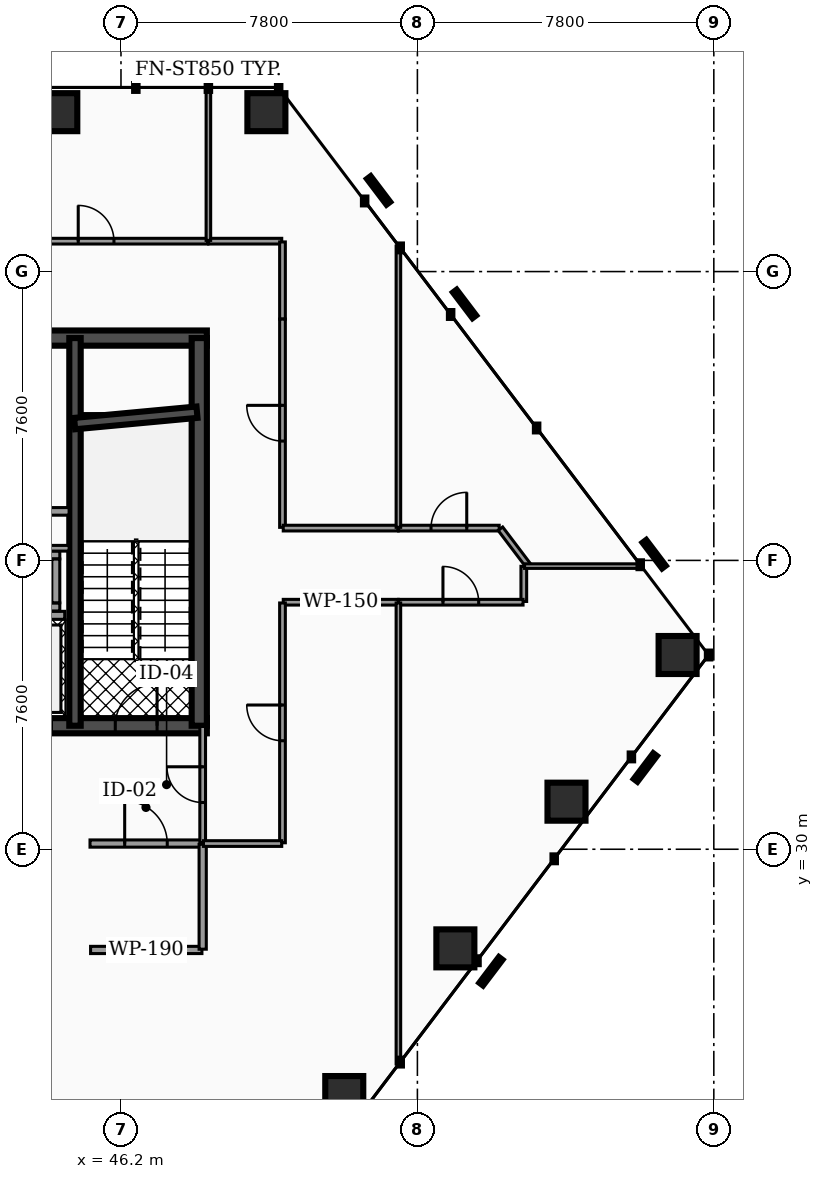
"""IFC4 building model, lengths in metres.
Left out: names, types, materials, properties, quantities, classifications, styles, units other than length and angle.
Written with IfcOpenShell. Run it as: python <this file> out.ifc"""

import sys

from ifc_helpers import new_model, si_unit, direction, frame, frame_2d, origin, origin_2d, place, context, subcontext, project, spatial, rectangle, hollow_rectangle, extrude, element, fill, save


model = new_model("IFC4")
c1 = context("Model", 3, precision=1e-05, world=origin(), true_north=direction((0.0, 1.0)))
c2 = subcontext(c1, "Body", "Model", "MODEL_VIEW")
j1 = project(units=[si_unit("LENGTHUNIT", "METRE"), si_unit("PLANEANGLEUNIT", "RADIAN")], contexts=[c1])
p1 = place(None, origin())
s1 = spatial("IfcSite", under=j1, at=p1, CompositionType="ELEMENT")
p2 = place(p1, origin())
s2 = spatial("IfcBuilding", under=s1, at=p2, CompositionType="ELEMENT")
p3 = place(p2, frame((0.0, 0.0, 43.86)))
s3 = spatial("IfcBuildingStorey", under=s2, at=p3, CompositionType="ELEMENT", Elevation=43.86)
p4 = place(p3, frame((28.4, 43.45, 0.0), z_axis=(0.0, 0.0, 1.0), x_axis=(1.0, 0.0, 0.0)))
e1 = element("IfcWall", 1, at=p4, inside=s3, PredefinedType="SHEAR", context=c2, shape_type="SweptSolid", body=[
    extrude(rectangle(XDim=20.06, YDim=0.4, at=frame_2d((10.03, 0.0))), origin(), (0.0, 0.0, 1.0), 3.82),
])
p5 = place(p3, frame((28.4, 33.25, 0.0), z_axis=(0.0, 0.0, 1.0), x_axis=(1.0, 0.0, 0.0)))
e2 = element("IfcWall", 2, at=p5, inside=s3, PredefinedType="SHEAR", context=c2, shape_type="SweptSolid", body=[
    extrude(rectangle(XDim=20.06, YDim=0.4, at=frame_2d((10.03, 0.0))), origin(), (0.0, 0.0, 1.0), 3.82),
])
p6 = place(p5, frame((4.03, 0.0, 0.0)))
e3 = element("IfcOpeningElement", 3, at=p6, cuts=e2, PredefinedType="OPENING", context=c2, shape_type="SweptSolid", body=[
    extrude(rectangle(XDim=1.1, YDim=2.15, at=frame_2d((0.55, 1.075))), frame((0.0, 0.21, 0.0), z_axis=(0.0, -1.0, 0.0), x_axis=(1.0, 0.0, 0.0)), (0.0, 0.0, 1.0), 0.42),
])
p7 = place(p5, frame((14.87, 0.0, 0.0)))
e4 = element("IfcOpeningElement", 4, at=p7, cuts=e2, PredefinedType="OPENING", context=c2, shape_type="SweptSolid", body=[
    extrude(rectangle(XDim=1.1, YDim=2.15, at=frame_2d((0.55, 1.075))), frame((0.0, 0.21, 0.0), z_axis=(0.0, -1.0, 0.0), x_axis=(1.0, 0.0, 0.0)), (0.0, 0.0, 1.0), 0.42),
])
p8 = place(p5, frame((1.31, 0.0, 0.0)))
e5 = element("IfcOpeningElement", 5, at=p8, cuts=e2, PredefinedType="OPENING", context=c2, shape_type="SweptSolid", body=[
    extrude(rectangle(XDim=1.1, YDim=2.2, at=frame_2d((0.55, 1.1))), frame((0.0, 0.21, 0.0), z_axis=(0.0, -1.0, 0.0), x_axis=(1.0, 0.0, 0.0)), (0.0, 0.0, 1.0), 0.42),
])
p9 = place(p5, frame((9.44, 0.0, 0.0)))
e6 = element("IfcOpeningElement", 6, at=p9, cuts=e2, PredefinedType="OPENING", context=c2, shape_type="SweptSolid", body=[
    extrude(rectangle(XDim=1.12, YDim=2.05, at=frame_2d((0.56, 1.025))), frame((0.0, 0.21, 0.0), z_axis=(0.0, -1.0, 0.0), x_axis=(1.0, 0.0, 0.0)), (0.0, 0.0, 1.0), 0.42),
])
p10 = place(p5, frame((17.65, 0.0, 0.0)))
e7 = element("IfcOpeningElement", 7, at=p10, cuts=e2, PredefinedType="OPENING", context=c2, shape_type="SweptSolid", body=[
    extrude(rectangle(XDim=1.1, YDim=2.2, at=frame_2d((0.55, 1.1))), frame((0.0, 0.21, 0.0), z_axis=(0.0, -1.0, 0.0), x_axis=(1.0, 0.0, 0.0)), (0.0, 0.0, 1.0), 0.42),
])
p11 = place(p3, frame((44.99, 33.25, 0.0), z_axis=(0.0, 0.0, 1.0), x_axis=(0.0, 1.0, 0.0)))
e8 = element("IfcWall", 8, at=p11, inside=s3, PredefinedType="SHEAR", context=c2, shape_type="SweptSolid", body=[
    extrude(rectangle(XDim=10.2, YDim=0.3, at=frame_2d((5.1, 0.0))), origin(), (0.0, 0.0, 1.0), 3.82),
])
p12 = place(p3, frame((48.26, 33.25, 0.0), z_axis=(0.0, 0.0, 1.0), x_axis=(0.0, 1.0, 0.0)))
e9 = element("IfcWall", 9, at=p12, inside=s3, PredefinedType="SHEAR", context=c2, shape_type="SweptSolid", body=[
    extrude(rectangle(XDim=10.2, YDim=0.4, at=frame_2d((5.1, 0.0))), origin(), (0.0, 0.0, 1.0), 3.82),
])
p13 = place(p3, frame((44.98, 41.2, 0.0), z_axis=(0.0, 0.0, 1.0), x_axis=(0.995686468965, 0.09278176286, 0.0)))
e10 = element("IfcWall", 10, at=p13, inside=s3, PredefinedType="SHEAR", context=c2, shape_type="SweptSolid", body=[
    extrude(rectangle(XDim=3.234, YDim=0.3, at=frame_2d((1.617, 0.0))), origin(), (0.0, 0.0, 1.0), 3.82),
])
for number, where, z_axis, x_axis in (
    (11, (50.026, 49.394, 0.0), (0.0, 0.0, 1.0), (1.0, 0.0, 0.0)),
    (12, (44.55, 49.394, 0.0), (0.0, 0.0, 1.0), (1.0, 0.0, 0.0)),
    (13, (52.075, 23.532, 0.0), (0.0, 0.0, 1.0), (1.0, 0.0, 0.0)),
    (14, (54.999, 27.392, 0.0), (0.0, 0.0, 1.0), (1.0, 0.0, 0.0)),
    (15, (57.923, 31.251, 0.0), (0.0, 0.0, 1.0), (1.0, 0.0, 0.0)),
    (16, (60.847, 35.111, 0.0), (0.0, 0.0, 1.0), (1.0, 0.0, 0.0)),
):
    element("IfcColumn", number, at=place(p3, frame(where, z_axis=z_axis, x_axis=x_axis)), inside=s3, PredefinedType="COLUMN", context=c2, shape_type="SweptSolid", body=[
        extrude(hollow_rectangle(XDim=1.0, YDim=1.0, WallThickness=0.05, at=origin_2d()), origin(), (0.0, 0.0, 1.0), 3.82),
    ])
p14 = place(p3, frame((42.92, 36.155, 0.0), z_axis=(0.0, 0.0, 1.0), x_axis=(1.0, 0.0, 0.0)))
e17 = element("IfcWall", 17, at=p14, inside=s3, PredefinedType="SOLIDWALL", context=c2, shape_type="SweptSolid", body=[
    extrude(rectangle(XDim=1.8, YDim=0.21, at=frame_2d((0.9, 0.0))), origin(), (0.0, 0.0, 1.0), 2.792),
])
for number, where, z_axis, x_axis in (
    (18, (42.99, 36.375, 0.0), (0.0, 0.0, 1.0), (1.0, 0.0, 0.0)),
    (19, (42.99, 37.745, 0.0), (0.0, 0.0, 1.0), (1.0, 0.0, 0.0)),
):
    element("IfcWall", number, at=place(p3, frame(where, z_axis=z_axis, x_axis=x_axis)), inside=s3, PredefinedType="SOLIDWALL", context=c2, shape_type="SweptSolid", body=[
        extrude(rectangle(XDim=1.6, YDim=0.21, at=frame_2d((0.8, 0.0))), origin(), (0.0, 0.0, 1.0), 3.82),
    ])
p15 = place(p3, frame((44.485, 36.485, 0.0), z_axis=(0.0, 0.0, 1.0), x_axis=(0.0, 1.0, 0.0)))
e20 = element("IfcWall", 20, at=p15, inside=s3, PredefinedType="SOLIDWALL", context=c2, shape_type="SweptSolid", body=[
    extrude(rectangle(XDim=1.15, YDim=0.21, at=frame_2d((0.575, 0.0))), origin(), (0.0, 0.0, 1.0), 3.82),
])
p16 = place(p3, frame((42.765, 38.89, 0.0), z_axis=(0.0, 0.0, 1.0), x_axis=(1.0, 0.0, 0.0)))
e21 = element("IfcWall", 21, at=p16, inside=s3, PredefinedType="PARTITIONING", context=c2, shape_type="SweptSolid", body=[
    extrude(rectangle(XDim=2.07, YDim=0.2, at=frame_2d((1.035, 0.0))), origin(), (0.0, 0.0, 1.0), 2.777),
])
p17 = place(p16, frame((0.595, 0.0, 0.0)))
e22 = element("IfcOpeningElement", 22, at=p17, cuts=e21, PredefinedType="OPENING", context=c2, shape_type="SweptSolid", body=[
    extrude(rectangle(XDim=0.88, YDim=2.05, at=frame_2d((0.44, 1.025))), frame((0.0, 0.11, 0.0), z_axis=(0.0, -1.0, 0.0), x_axis=(1.0, 0.0, 0.0)), (0.0, 0.0, 1.0), 0.22),
])
p18 = place(p3, frame((41.62, 37.92, 0.0), z_axis=(0.0, 0.0, 1.0), x_axis=(1.0, 0.0, 0.0)))
e23 = element("IfcWall", 23, at=p18, inside=s3, PredefinedType="PARTITIONING", context=c2, shape_type="SweptSolid", body=[
    extrude(rectangle(XDim=3.215, YDim=0.15, at=frame_2d((1.607, 0.0))), origin(), (0.0, 0.0, 1.0), 2.777),
])
p19 = place(p18, frame((0.337, 0.0, 0.0)))
e24 = element("IfcOpeningElement", 24, at=p19, cuts=e23, PredefinedType="OPENING", context=c2, shape_type="SweptSolid", body=[
    extrude(rectangle(XDim=0.94, YDim=2.05, at=frame_2d((0.47, 1.025))), frame((0.0, 0.085, 0.0), z_axis=(0.0, -1.0, 0.0), x_axis=(1.0, 0.0, 0.0)), (0.0, 0.0, 1.0), 0.17),
])
p20 = place(p3, frame((45.385, 30.15, 0.0), z_axis=(0.0, 0.0, 1.0), x_axis=(1.0, 0.0, 0.0)))
e25 = element("IfcWall", 25, at=p20, inside=s3, PredefinedType="PARTITIONING", context=c2, shape_type="SweptSolid", body=[
    extrude(rectangle(XDim=2.945, YDim=0.19, at=frame_2d((1.473, 0.0))), origin(), (0.0, 0.0, 1.0), 2.777),
])
p21 = place(p20, frame((0.913, 0.0, 0.0)))
e26 = element("IfcOpeningElement", 26, at=p21, cuts=e25, PredefinedType="OPENING", context=c2, shape_type="SweptSolid", body=[
    extrude(rectangle(XDim=1.12, YDim=2.05, at=frame_2d((0.56, 1.025))), frame((0.0, 0.105, 0.0), z_axis=(0.0, -1.0, 0.0), x_axis=(1.0, 0.0, 0.0)), (0.0, 0.0, 1.0), 0.21),
])
p22 = place(p3, frame((48.35, 30.17, 0.0), z_axis=(0.0, 0.0, 1.0), x_axis=(0.0, 1.0, 0.0)))
e27 = element("IfcWall", 27, at=p22, inside=s3, PredefinedType="PARTITIONING", context=c2, shape_type="SweptSolid", body=[
    extrude(rectangle(XDim=3.06, YDim=0.15, at=frame_2d((1.53, 0.0))), origin(), (0.0, 0.0, 1.0), 2.777),
])
p23 = place(p22, frame((1.06, 0.0, 0.0)))
e28 = element("IfcOpeningElement", 28, at=p23, cuts=e27, PredefinedType="OPENING", context=c2, shape_type="SweptSolid", body=[
    extrude(rectangle(XDim=0.94, YDim=2.05, at=frame_2d((0.47, 1.025))), frame((0.0, 0.085, 0.0), z_axis=(0.0, -1.0, 0.0), x_axis=(1.0, 0.0, 0.0)), (0.0, 0.0, 1.0), 0.17),
])
p24 = place(p3, frame((45.4, 27.35, 0.0), z_axis=(0.0, 0.0, 1.0), x_axis=(1.0, 0.0, 0.0)))
e29 = element("IfcWall", 29, at=p24, inside=s3, PredefinedType="PARTITIONING", context=c2, shape_type="SweptSolid", body=[
    extrude(rectangle(XDim=2.93, YDim=0.19, at=frame_2d((1.465, 0.0))), origin(), (0.0, 0.0, 1.0), 2.777),
])
p25 = place(p3, frame((48.35, 27.37, 0.0), z_axis=(0.0, 0.0, 1.0), x_axis=(0.0, 1.0, 0.0)))
e30 = element("IfcWall", 30, at=p25, inside=s3, PredefinedType="PARTITIONING", context=c2, shape_type="SweptSolid", body=[
    extrude(rectangle(XDim=2.76, YDim=0.19, at=frame_2d((1.38, 0.0))), origin(), (0.0, 0.0, 1.0), 2.777),
])
p26 = place(p3, frame((50.47, 36.5, 0.0), z_axis=(0.0, 0.0, 1.0), x_axis=(1.0, 0.0, 0.0)))
e31 = element("IfcWall", 31, at=p26, inside=s3, PredefinedType="PARTITIONING", context=c2, shape_type="SweptSolid", body=[
    extrude(rectangle(XDim=3.025, YDim=0.15, at=frame_2d((1.513, 0.0))), origin(), (0.0, 0.0, 1.0), 2.777),
])
p27 = place(p3, frame((50.45, 30.17, 0.0), z_axis=(0.0, 0.0, 1.0), x_axis=(0.0, 1.0, 0.0)))
e32 = element("IfcWall", 32, at=p27, inside=s3, PredefinedType="PARTITIONING", context=c2, shape_type="SweptSolid", body=[
    extrude(rectangle(XDim=6.31, YDim=0.15, at=frame_2d((3.155, 0.0))), origin(), (0.0, 0.0, 1.0), 2.777),
])
p28 = place(p27, frame((2.685, 0.0, 0.0)))
e33 = element("IfcOpeningElement", 33, at=p28, cuts=e32, PredefinedType="OPENING", context=c2, shape_type="SweptSolid", body=[
    extrude(rectangle(XDim=0.94, YDim=2.05, at=frame_2d((0.47, 1.025))), frame((0.0, 0.085, 0.0), z_axis=(0.0, -1.0, 0.0), x_axis=(1.0, 0.0, 0.0)), (0.0, 0.0, 1.0), 0.17),
])
p29 = place(p3, frame((48.37, 30.15, 0.0), z_axis=(0.0, 0.0, 1.0), x_axis=(1.0, 0.0, 0.0)))
e34 = element("IfcWall", 34, at=p29, inside=s3, PredefinedType="PARTITIONING", context=c2, shape_type="SweptSolid", body=[
    extrude(rectangle(XDim=2.06, YDim=0.15, at=frame_2d((1.03, 0.0))), origin(), (0.0, 0.0, 1.0), 2.777),
])
p30 = place(p3, frame((56.8, 36.52, 0.0), z_axis=(0.0, 0.0, 1.0), x_axis=(0.0, 1.0, 0.0)))
e35 = element("IfcWall", 35, at=p30, inside=s3, PredefinedType="PARTITIONING", context=c2, shape_type="SweptSolid", body=[
    extrude(rectangle(XDim=0.925, YDim=0.15, at=frame_2d((0.462, 0.0))), origin(), (0.0, 0.0, 1.0), 2.777),
])
p31 = place(p3, frame((53.505, 36.5, 0.0), z_axis=(0.0, 0.0, 1.0), x_axis=(1.0, 0.0, 0.0)))
e36 = element("IfcWall", 36, at=p31, inside=s3, PredefinedType="PARTITIONING", context=c2, shape_type="SweptSolid", body=[
    extrude(rectangle(XDim=3.275, YDim=0.15, at=frame_2d((1.638, 0.0))), origin(), (0.0, 0.0, 1.0), 2.777),
])
p32 = place(p31, frame((1.167, 0.0, 0.0)))
e37 = element("IfcOpeningElement", 37, at=p32, cuts=e36, PredefinedType="OPENING", context=c2, shape_type="SweptSolid", body=[
    extrude(rectangle(XDim=0.94, YDim=2.05, at=frame_2d((0.47, 1.025))), frame((0.0, 0.085, 0.0), z_axis=(0.0, -1.0, 0.0), x_axis=(1.0, 0.0, 0.0)), (0.0, 0.0, 1.0), 0.17),
])
p33 = place(p3, frame((53.505, 38.45, 0.0), z_axis=(0.0, 0.0, 1.0), x_axis=(1.0, 0.0, 0.0)))
e38 = element("IfcWall", 38, at=p33, inside=s3, PredefinedType="PARTITIONING", context=c2, shape_type="SweptSolid", body=[
    extrude(rectangle(XDim=2.647, YDim=0.15, at=frame_2d((1.324, 0.0))), origin(), (0.0, 0.0, 1.0), 2.777),
])
p34 = place(p33, frame((0.854, 0.0, 0.0)))
e39 = element("IfcOpeningElement", 39, at=p34, cuts=e38, PredefinedType="OPENING", context=c2, shape_type="SweptSolid", body=[
    extrude(rectangle(XDim=0.94, YDim=2.05, at=frame_2d((0.47, 1.025))), frame((0.0, 0.085, 0.0), z_axis=(0.0, -1.0, 0.0), x_axis=(1.0, 0.0, 0.0)), (0.0, 0.0, 1.0), 0.17),
])
p35 = place(p3, frame((56.184, 38.434, 0.0), z_axis=(0.0, 0.0, 1.0), x_axis=(0.603900079305, -0.797060031751, 0.0)))
e40 = element("IfcWall", 40, at=p35, inside=s3, PredefinedType="PARTITIONING", context=c2, shape_type="SweptSolid", body=[
    extrude(rectangle(XDim=1.22, YDim=0.15, at=frame_2d((0.61, 0.0))), origin(), (0.0, 0.0, 1.0), 2.777),
])
p36 = place(p3, frame((48.505, 46.0, 0.0), z_axis=(0.0, 0.0, 1.0), x_axis=(1.0, 0.0, 0.0)))
e41 = element("IfcWall", 41, at=p36, inside=s3, PredefinedType="PARTITIONING", context=c2, shape_type="SweptSolid", body=[
    extrude(rectangle(XDim=1.925, YDim=0.15, at=frame_2d((0.962, 0.0))), origin(), (0.0, 0.0, 1.0), 2.777),
])
p37 = place(p3, frame((50.45, 43.95, 0.0), z_axis=(0.0, 0.0, 1.0), x_axis=(0.0, 1.0, 0.0)))
e42 = element("IfcWall", 42, at=p37, inside=s3, PredefinedType="PARTITIONING", context=c2, shape_type="SweptSolid", body=[
    extrude(rectangle(XDim=2.03, YDim=0.15, at=frame_2d((1.015, 0.0))), origin(), (0.0, 0.0, 1.0), 2.777),
])
p38 = place(p3, frame((50.45, 38.47, 0.0), z_axis=(0.0, 0.0, 1.0), x_axis=(0.0, 1.0, 0.0)))
e43 = element("IfcWall", 43, at=p38, inside=s3, PredefinedType="PARTITIONING", context=c2, shape_type="SweptSolid", body=[
    extrude(rectangle(XDim=5.48, YDim=0.15, at=frame_2d((2.74, 0.0))), origin(), (0.0, 0.0, 1.0), 2.777),
])
p39 = place(p38, frame((2.27, 0.0, 0.0)))
e44 = element("IfcOpeningElement", 44, at=p39, cuts=e43, PredefinedType="OPENING", context=c2, shape_type="SweptSolid", body=[
    extrude(rectangle(XDim=0.94, YDim=2.05, at=frame_2d((0.47, 1.025))), frame((0.0, 0.085, 0.0), z_axis=(0.0, -1.0, 0.0), x_axis=(1.0, 0.0, 0.0)), (0.0, 0.0, 1.0), 0.17),
])
p40 = place(p3, frame((50.47, 38.45, 0.0), z_axis=(0.0, 0.0, 1.0), x_axis=(1.0, 0.0, 0.0)))
e45 = element("IfcWall", 45, at=p40, inside=s3, PredefinedType="PARTITIONING", context=c2, shape_type="SweptSolid", body=[
    extrude(rectangle(XDim=3.025, YDim=0.15, at=frame_2d((1.513, 0.0))), origin(), (0.0, 0.0, 1.0), 2.777),
])
p41 = place(p3, frame((42.605, 46.0, 0.0), z_axis=(0.0, 0.0, 1.0), x_axis=(1.0, 0.0, 0.0)))
e46 = element("IfcWall", 46, at=p41, inside=s3, PredefinedType="PARTITIONING", context=c2, shape_type="SweptSolid", body=[
    extrude(rectangle(XDim=5.88, YDim=0.15, at=frame_2d((2.94, 0.0))), origin(), (0.0, 0.0, 1.0), 2.777),
])
p42 = place(p41, frame((2.47, 0.0, 0.0)))
e47 = element("IfcOpeningElement", 47, at=p42, cuts=e46, PredefinedType="OPENING", context=c2, shape_type="SweptSolid", body=[
    extrude(rectangle(XDim=0.94, YDim=2.05, at=frame_2d((0.47, 1.025))), frame((0.0, 0.085, 0.0), z_axis=(0.0, -1.0, 0.0), x_axis=(1.0, 0.0, 0.0)), (0.0, 0.0, 1.0), 0.17),
])
p43 = place(p3, frame((53.5, 24.351, 0.0), z_axis=(0.0, 0.0, 1.0), x_axis=(0.0, 1.0, 0.0)))
e48 = element("IfcWall", 48, at=p43, inside=s3, PredefinedType="PARTITIONING", context=c2, shape_type="SweptSolid", body=[
    extrude(rectangle(XDim=12.129, YDim=0.12, at=frame_2d((6.064, 0.0))), origin(), (0.0, 0.0, 1.0), 2.777),
])
p44 = place(p3, frame((56.82, 37.45, 0.0), z_axis=(0.0, 0.0, 1.0), x_axis=(1.0, 0.0, 0.0)))
e49 = element("IfcWall", 49, at=p44, inside=s3, PredefinedType="PARTITIONING", context=c2, shape_type="SweptSolid", body=[
    extrude(rectangle(XDim=3.055, YDim=0.12, at=frame_2d((1.528, 0.0))), origin(), (0.0, 0.0, 1.0), 2.777),
])
p45 = place(p3, frame((53.5, 38.47, 0.0), z_axis=(0.0, 0.0, 1.0), x_axis=(0.0, 1.0, 0.0)))
e50 = element("IfcWall", 50, at=p45, inside=s3, PredefinedType="PARTITIONING", context=c2, shape_type="SweptSolid", body=[
    extrude(rectangle(XDim=7.401, YDim=0.12, at=frame_2d((3.7, 0.0))), origin(), (0.0, 0.0, 1.0), 2.777),
])
p46 = place(p3, frame((48.5, 46.02, 0.0), z_axis=(0.0, 0.0, 1.0), x_axis=(0.0, 1.0, 0.0)))
e51 = element("IfcWall", 51, at=p46, inside=s3, PredefinedType="PARTITIONING", context=c2, shape_type="SweptSolid", body=[
    extrude(rectangle(XDim=4.009, YDim=0.12, at=frame_2d((2.005, 0.0))), origin(), (0.0, 0.0, 1.0), 2.777),
])
p47 = place(p10, origin())
e52 = element("IfcDoor", 52, at=p47, inside=s3, OperationType="SINGLE_SWING_RIGHT", PredefinedType="DOOR", context=c2, shape_type="SweptSolid", body=[
    extrude(rectangle(XDim=1.1, YDim=2.2, at=frame_2d((0.55, 1.1))), frame((0.0, 0.025, 0.0), z_axis=(0.0, -1.0, 0.0), x_axis=(1.0, 0.0, 0.0)), (0.0, 0.0, 1.0), 0.05),
])
fill(e7, e52)
p48 = place(p21, origin())
e53 = element("IfcDoor", 53, at=p48, inside=s3, OperationType="SINGLE_SWING_LEFT", PredefinedType="DOOR", context=c2, shape_type="SweptSolid", body=[
    extrude(rectangle(XDim=1.12, YDim=2.05, at=frame_2d((0.56, 1.025))), frame((0.0, 0.025, 0.0), z_axis=(0.0, -1.0, 0.0), x_axis=(1.0, 0.0, 0.0)), (0.0, 0.0, 1.0), 0.05),
])
fill(e26, e53)
p49 = place(p23, origin())
e54 = element("IfcDoor", 54, at=p49, inside=s3, OperationType="SINGLE_SWING_RIGHT", PredefinedType="DOOR", context=c2, shape_type="SweptSolid", body=[
    extrude(rectangle(XDim=0.94, YDim=2.05, at=frame_2d((0.47, 1.025))), frame((0.0, 0.025, 0.0), z_axis=(0.0, -1.0, 0.0), x_axis=(1.0, 0.0, 0.0)), (0.0, 0.0, 1.0), 0.05),
])
fill(e28, e54)
p50 = place(p28, origin())
e55 = element("IfcDoor", 55, at=p50, inside=s3, OperationType="SINGLE_SWING_RIGHT", PredefinedType="DOOR", context=c2, shape_type="SweptSolid", body=[
    extrude(rectangle(XDim=0.94, YDim=2.05, at=frame_2d((0.47, 1.025))), frame((0.0, 0.025, 0.0), z_axis=(0.0, -1.0, 0.0), x_axis=(1.0, 0.0, 0.0)), (0.0, 0.0, 1.0), 0.05),
])
fill(e33, e55)
p51 = place(p32, origin())
e56 = element("IfcDoor", 56, at=p51, inside=s3, OperationType="SINGLE_SWING_LEFT", PredefinedType="DOOR", context=c2, shape_type="SweptSolid", body=[
    extrude(rectangle(XDim=0.94, YDim=2.05, at=frame_2d((0.47, 1.025))), frame((0.0, 0.025, 0.0), z_axis=(0.0, -1.0, 0.0), x_axis=(1.0, 0.0, 0.0)), (0.0, 0.0, 1.0), 0.05),
])
fill(e37, e56)
p52 = place(p34, origin())
e57 = element("IfcDoor", 57, at=p52, inside=s3, OperationType="SINGLE_SWING_RIGHT", PredefinedType="DOOR", context=c2, shape_type="SweptSolid", body=[
    extrude(rectangle(XDim=0.94, YDim=2.05, at=frame_2d((0.47, 1.025))), frame((0.0, 0.025, 0.0), z_axis=(0.0, -1.0, 0.0), x_axis=(1.0, 0.0, 0.0)), (0.0, 0.0, 1.0), 0.05),
])
fill(e39, e57)
p53 = place(p39, origin())
e58 = element("IfcDoor", 58, at=p53, inside=s3, OperationType="SINGLE_SWING_RIGHT", PredefinedType="DOOR", context=c2, shape_type="SweptSolid", body=[
    extrude(rectangle(XDim=0.94, YDim=2.05, at=frame_2d((0.47, 1.025))), frame((0.0, 0.025, 0.0), z_axis=(0.0, -1.0, 0.0), x_axis=(1.0, 0.0, 0.0)), (0.0, 0.0, 1.0), 0.05),
])
fill(e44, e58)
p54 = place(p42, origin())
e59 = element("IfcDoor", 59, at=p54, inside=s3, OperationType="SINGLE_SWING_LEFT", PredefinedType="DOOR", context=c2, shape_type="SweptSolid", body=[
    extrude(rectangle(XDim=0.94, YDim=2.05, at=frame_2d((0.47, 1.025))), frame((0.0, 0.025, 0.0), z_axis=(0.0, -1.0, 0.0), x_axis=(1.0, 0.0, 0.0)), (0.0, 0.0, 1.0), 0.05),
])
fill(e47, e59)
save(model, sys.argv[1])
